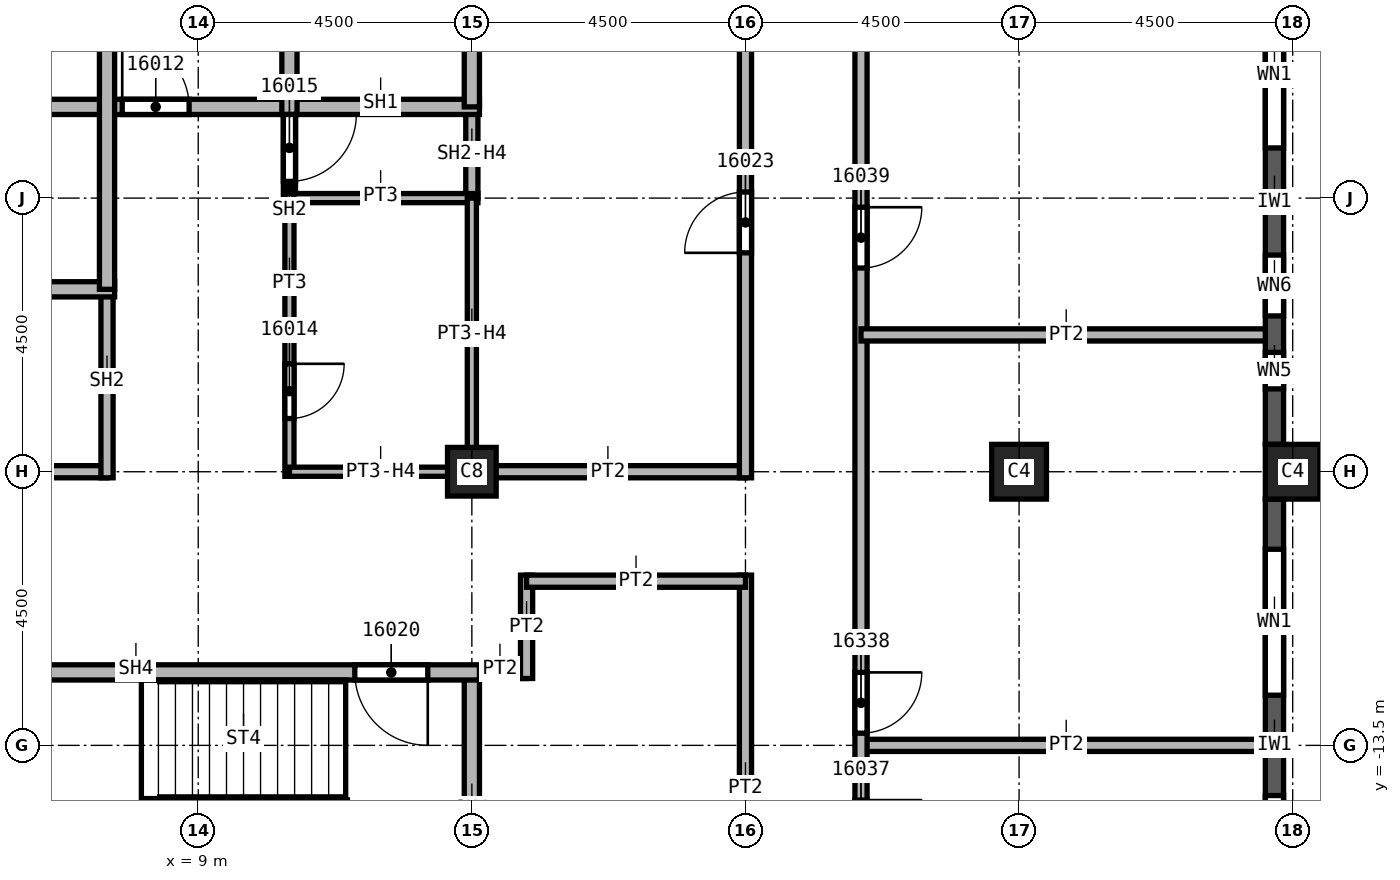
"""IFC4 building model, lengths in metres.
Left out: names, types, materials, properties, quantities, classifications, styles, units other than length and angle.
Written with IfcOpenShell. Run it as: python <this file> out.ifc"""

import sys

from ifc_helpers import new_model, si_unit, direction, frame, frame_2d, origin, origin_2d, place, context, subcontext, project, spatial, rectangle, extrude, element, fill, save


model = new_model("IFC4")
c1 = context("Model", 3, precision=1e-05, world=origin(), true_north=direction((0.0, 1.0)))
c2 = subcontext(c1, "Body", "Model", "MODEL_VIEW")
j1 = project(units=[si_unit("LENGTHUNIT", "METRE"), si_unit("PLANEANGLEUNIT", "RADIAN")], contexts=[c1])
p1 = place(None, origin())
s1 = spatial("IfcSite", under=j1, at=p1, CompositionType="ELEMENT")
p2 = place(p1, origin())
s2 = spatial("IfcBuilding", under=s1, at=p2, CompositionType="ELEMENT")
p3 = place(p2, frame((0.0, 0.0, 246.0)))
s3 = spatial("IfcBuildingStorey", under=s2, at=p3, CompositionType="ELEMENT", Elevation=246.0)
p4 = place(p3, frame((22.5, -9.0, 0.0), z_axis=(0.0, 0.0, 1.0), x_axis=(1.0, 0.0, 0.0)))
e1 = element("IfcColumn", 1, at=p4, inside=s3, PredefinedType="COLUMN", context=c2, shape_type="SweptSolid", body=[
    extrude(rectangle(XDim=0.9, YDim=0.9, at=origin_2d()), origin(), (0.0, 0.0, 1.0), 3.72),
])
p5 = place(p3, frame((13.5, -9.0, 0.0), z_axis=(0.0, 0.0, 1.0), x_axis=(1.0, 0.0, 0.0)))
e2 = element("IfcColumn", 2, at=p5, inside=s3, PredefinedType="COLUMN", context=c2, shape_type="SweptSolid", body=[
    extrude(rectangle(XDim=0.8, YDim=0.8, at=origin_2d()), origin(), (0.0, 0.0, 1.0), 3.72),
])
p6 = place(p3, frame((27.0, -9.0, 0.0), z_axis=(0.0, 0.0, 1.0), x_axis=(0.0, 1.0, 0.0)))
e3 = element("IfcColumn", 3, at=p6, inside=s3, PredefinedType="COLUMN", context=c2, shape_type="SweptSolid", body=[
    extrude(rectangle(XDim=0.9, YDim=0.9, at=origin_2d()), origin(), (0.0, 0.0, 1.0), 3.72),
])
p7 = place(p3, frame((26.7, -17.55, 0.0), z_axis=(0.0, 0.0, 1.0), x_axis=(0.0, 1.0, 0.0)))
e4 = element("IfcWall", 4, at=p7, inside=s3, PredefinedType="SOLIDWALL", context=c2, shape_type="SweptSolid", body=[
    extrude(rectangle(XDim=8.1, YDim=0.3, at=frame_2d((4.05, 0.0))), origin(), (0.0, 0.0, 1.0), 3.12),
])
p8 = place(p7, frame((0.825, 0.0, 0.8)))
e5 = element("IfcOpeningElement", 5, at=p8, cuts=e4, PredefinedType="OPENING", context=c2, shape_type="SweptSolid", body=[
    extrude(rectangle(XDim=2.4, YDim=1.95, at=frame_2d((1.2, 0.975))), frame((0.0, 0.15, 0.0), z_axis=(0.0, -1.0, 0.0), x_axis=(1.0, 0.0, 0.0)), (0.0, 0.0, 1.0), 0.3),
])
p9 = place(p7, frame((4.875, 0.0, 0.8)))
e6 = element("IfcOpeningElement", 6, at=p9, cuts=e4, PredefinedType="OPENING", context=c2, shape_type="SweptSolid", body=[
    extrude(rectangle(XDim=2.4, YDim=1.95, at=frame_2d((1.2, 0.975))), frame((0.0, 0.15, 0.0), z_axis=(0.0, -1.0, 0.0), x_axis=(1.0, 0.0, 0.0)), (0.0, 0.0, 1.0), 0.3),
])
p10 = place(p3, frame((26.7, -8.55, 0.0), z_axis=(0.0, 0.0, 1.0), x_axis=(0.0, 1.0, 0.0)))
e7 = element("IfcWall", 7, at=p10, inside=s3, PredefinedType="SOLIDWALL", context=c2, shape_type="SweptSolid", body=[
    extrude(rectangle(XDim=8.1, YDim=0.3, at=frame_2d((4.05, 0.0))), origin(), (0.0, 0.0, 1.0), 3.12),
])
p11 = place(p10, frame((4.875, 0.0, 0.8)))
e8 = element("IfcOpeningElement", 8, at=p11, cuts=e7, PredefinedType="OPENING", context=c2, shape_type="SweptSolid", body=[
    extrude(rectangle(XDim=2.4, YDim=1.95, at=frame_2d((1.2, 0.975))), frame((0.0, 0.15, 0.0), z_axis=(0.0, -1.0, 0.0), x_axis=(1.0, 0.0, 0.0)), (0.0, 0.0, 1.0), 0.3),
])
p12 = place(p10, frame((0.913, 0.0, 0.8)))
e9 = element("IfcOpeningElement", 9, at=p12, cuts=e7, PredefinedType="OPENING", context=c2, shape_type="SweptSolid", body=[
    extrude(rectangle(XDim=0.6, YDim=1.95, at=frame_2d((0.3, 0.975))), frame((0.0, 0.15, 0.0), z_axis=(0.0, -1.0, 0.0), x_axis=(1.0, 0.0, 0.0)), (0.0, 0.0, 1.0), 0.3),
])
p13 = place(p10, frame((2.113, 0.0, 0.8)))
e10 = element("IfcOpeningElement", 10, at=p13, cuts=e7, PredefinedType="OPENING", context=c2, shape_type="SweptSolid", body=[
    extrude(rectangle(XDim=1.0, YDim=1.95, at=frame_2d((0.5, 0.975))), frame((0.0, 0.15, 0.0), z_axis=(0.0, -1.0, 0.0), x_axis=(1.0, 0.0, 0.0)), (0.0, 0.0, 1.0), 0.3),
])
p14 = place(p3, frame((13.5, -9.0, 0.0), z_axis=(0.0, 0.0, 1.0), x_axis=(1.0, 0.0, 0.0)))
e11 = element("IfcWall", 11, at=p14, inside=s3, PredefinedType="PARTITIONING", context=c2, shape_type="SweptSolid", body=[
    extrude(rectangle(XDim=4.5, YDim=0.2, at=frame_2d((2.25, 0.0))), origin(), (0.0, 0.0, 1.0), 3.72),
])
p15 = place(p3, frame((14.4, -12.3, 0.0), z_axis=(0.0, 0.0, 1.0), x_axis=(-1.0, 0.0, 0.0)))
e12 = element("IfcWall", 12, at=p15, inside=s3, PredefinedType="PARTITIONING", context=c2, shape_type="SweptSolid", body=[
    extrude(rectangle(XDim=1.025, YDim=0.2, at=frame_2d((0.512, 0.0))), origin(), (0.0, 0.0, 1.0), 3.72),
])
p16 = place(p3, frame((14.4, -10.7, 0.0), z_axis=(0.0, 0.0, 1.0), x_axis=(0.0, -1.0, 0.0)))
e13 = element("IfcWall", 13, at=p16, inside=s3, PredefinedType="PARTITIONING", context=c2, shape_type="SweptSolid", body=[
    extrude(rectangle(XDim=1.7, YDim=0.2, at=frame_2d((0.85, 0.0))), origin(), (0.0, 0.0, 1.0), 3.72),
])
p17 = place(p3, frame((18.0, -21.9, 0.0), z_axis=(0.0, 0.0, 1.0), x_axis=(0.0, 1.0, 0.0)))
e14 = element("IfcWall", 14, at=p17, inside=s3, PredefinedType="PARTITIONING", context=c2, shape_type="SweptSolid", body=[
    extrude(rectangle(XDim=11.2, YDim=0.2, at=frame_2d((5.6, 0.0))), origin(), (0.0, 0.0, 1.0), 3.72),
])
p18 = place(p17, frame((3.4, 0.0, 0.0)))
e15 = element("IfcOpeningElement", 15, at=p18, cuts=e14, PredefinedType="OPENING", context=c2, shape_type="SweptSolid", body=[
    extrude(rectangle(XDim=1.0, YDim=2.1, at=frame_2d((0.5, 1.05))), frame((0.0, 0.1, 0.0), z_axis=(0.0, -1.0, 0.0), x_axis=(1.0, 0.0, 0.0)), (0.0, 0.0, 1.0), 0.2),
])
p19 = place(p3, frame((18.0, -10.8, 0.0), z_axis=(0.0, 0.0, 1.0), x_axis=(-1.0, 0.0, 0.0)))
e16 = element("IfcWall", 16, at=p19, inside=s3, PredefinedType="PARTITIONING", context=c2, shape_type="SweptSolid", body=[
    extrude(rectangle(XDim=3.6, YDim=0.2, at=frame_2d((1.8, 0.0))), origin(), (0.0, 0.0, 1.0), 3.72),
])
p20 = place(p3, frame((18.0, -9.1, 0.0), z_axis=(0.0, 0.0, 1.0), x_axis=(0.0, 1.0, 0.0)))
e17 = element("IfcWall", 17, at=p20, inside=s3, PredefinedType="PARTITIONING", context=c2, shape_type="SweptSolid", body=[
    extrude(rectangle(XDim=18.2, YDim=0.2, at=frame_2d((9.1, 0.0))), origin(), (0.0, 0.0, 1.0), 3.72),
])
p21 = place(p20, frame((3.7, 0.0, 0.0)))
e18 = element("IfcOpeningElement", 18, at=p21, cuts=e17, PredefinedType="OPENING", context=c2, shape_type="SweptSolid", body=[
    extrude(rectangle(XDim=1.0, YDim=2.1, at=frame_2d((0.5, 1.05))), frame((0.0, 0.1, 0.0), z_axis=(0.0, -1.0, 0.0), x_axis=(1.0, 0.0, 0.0)), (0.0, 0.0, 1.0), 0.2),
])
p22 = place(p20, frame((16.9, 0.0, 0.0)))
e19 = element("IfcOpeningElement", 19, at=p22, cuts=e17, PredefinedType="OPENING", context=c2, shape_type="SweptSolid", body=[
    extrude(rectangle(XDim=1.0, YDim=2.1, at=frame_2d((0.5, 1.05))), frame((0.0, 0.1, 0.0), z_axis=(0.0, -1.0, 0.0), x_axis=(1.0, 0.0, 0.0)), (0.0, 0.0, 1.0), 0.2),
])
p23 = place(p3, frame((19.9, -13.5, 0.0), z_axis=(0.0, 0.0, 1.0), x_axis=(1.0, 0.0, 0.0)))
e20 = element("IfcWall", 20, at=p23, inside=s3, PredefinedType="PARTITIONING", context=c2, shape_type="SweptSolid", body=[
    extrude(rectangle(XDim=6.65, YDim=0.2, at=frame_2d((3.325, 0.0))), origin(), (0.0, 0.0, 1.0), 3.72),
])
p24 = place(p3, frame((19.9, 21.9, 0.0), z_axis=(0.0, 0.0, 1.0), x_axis=(0.0, -1.0, 0.0)))
e21 = element("IfcWall", 21, at=p24, inside=s3, PredefinedType="PARTITIONING", context=c2, shape_type="SweptSolid", body=[
    extrude(rectangle(XDim=43.8, YDim=0.2, at=frame_2d((21.9, 0.0))), origin(), (0.0, 0.0, 1.0), 3.72),
])
p25 = place(p24, frame((14.7, 0.0, 0.0)))
e22 = element("IfcOpeningElement", 22, at=p25, cuts=e21, PredefinedType="OPENING", context=c2, shape_type="SweptSolid", body=[
    extrude(rectangle(XDim=1.0, YDim=2.1, at=frame_2d((0.5, 1.05))), frame((0.0, 0.1, 0.0), z_axis=(0.0, -1.0, 0.0), x_axis=(1.0, 0.0, 0.0)), (0.0, 0.0, 1.0), 0.2),
])
p26 = place(p24, frame((1.9, 0.0, 0.0)))
e23 = element("IfcOpeningElement", 23, at=p26, cuts=e21, PredefinedType="OPENING", context=c2, shape_type="SweptSolid", body=[
    extrude(rectangle(XDim=1.0, YDim=2.1, at=frame_2d((0.5, 1.05))), frame((0.0, 0.1, 0.0), z_axis=(0.0, -1.0, 0.0), x_axis=(1.0, 0.0, 0.0)), (0.0, 0.0, 1.0), 0.2),
])
p27 = place(p24, frame((36.3, 0.0, 0.0)))
e24 = element("IfcOpeningElement", 24, at=p27, cuts=e21, PredefinedType="OPENING", context=c2, shape_type="SweptSolid", body=[
    extrude(rectangle(XDim=1.0, YDim=2.1, at=frame_2d((0.5, 1.05))), frame((0.0, 0.1, 0.0), z_axis=(0.0, -1.0, 0.0), x_axis=(1.0, 0.0, 0.0)), (0.0, 0.0, 1.0), 0.2),
])
p28 = place(p24, frame((34.2, 0.0, 0.0)))
e25 = element("IfcOpeningElement", 25, at=p28, cuts=e21, PredefinedType="OPENING", context=c2, shape_type="SweptSolid", body=[
    extrude(rectangle(XDim=1.0, YDim=2.1, at=frame_2d((0.5, 1.05))), frame((0.0, 0.1, 0.0), z_axis=(0.0, -1.0, 0.0), x_axis=(1.0, 0.0, 0.0)), (0.0, 0.0, 1.0), 0.2),
])
p29 = place(p24, frame((26.55, 0.0, 0.0)))
e26 = element("IfcOpeningElement", 26, at=p29, cuts=e21, PredefinedType="OPENING", context=c2, shape_type="SweptSolid", body=[
    extrude(rectangle(XDim=1.0, YDim=2.1, at=frame_2d((0.5, 1.05))), frame((0.0, 0.1, 0.0), z_axis=(0.0, -1.0, 0.0), x_axis=(1.0, 0.0, 0.0)), (0.0, 0.0, 1.0), 0.2),
])
p30 = place(p3, frame((19.9, -6.75, 0.0), z_axis=(0.0, 0.0, 1.0), x_axis=(1.0, 0.0, 0.0)))
e27 = element("IfcWall", 27, at=p30, inside=s3, PredefinedType="PARTITIONING", context=c2, shape_type="SweptSolid", body=[
    extrude(rectangle(XDim=6.65, YDim=0.2, at=frame_2d((3.325, 0.0))), origin(), (0.0, 0.0, 1.0), 3.72),
])
p31 = place(p3, frame((7.5, -9.0, 0.0), z_axis=(0.0, 0.0, 1.0), x_axis=(-1.0, 0.0, 0.0)))
e28 = element("IfcWall", 28, at=p31, inside=s3, PredefinedType="SOLIDWALL", context=c2, shape_type="SweptSolid", body=[
    extrude(rectangle(XDim=3.0, YDim=0.2, at=frame_2d((1.5, 0.0))), origin(), (0.0, 0.0, 1.0), 3.042),
])
p32 = place(p3, frame((7.5, -6.0, 0.0), z_axis=(0.0, 0.0, 1.0), x_axis=(0.0, -1.0, 0.0)))
e29 = element("IfcWall", 29, at=p32, inside=s3, PredefinedType="SOLIDWALL", context=c2, shape_type="SweptSolid", body=[
    extrude(rectangle(XDim=3.1, YDim=0.2, at=frame_2d((1.55, 0.0))), origin(), (0.0, 0.0, 1.0), 3.72),
])
p33 = place(p3, frame((10.5, -2.875, 0.0), z_axis=(0.0, 0.0, 1.0), x_axis=(0.0, -1.0, 0.0)))
e30 = element("IfcWall", 30, at=p33, inside=s3, PredefinedType="SOLIDWALL", context=c2, shape_type="SweptSolid", body=[
    extrude(rectangle(XDim=1.7, YDim=0.2, at=frame_2d((0.85, 0.0))), origin(), (0.0, 0.0, 1.0), 3.72),
])
p34 = place(p33, frame((0.25, 0.0, 0.0)))
e31 = element("IfcOpeningElement", 31, at=p34, cuts=e30, PredefinedType="OPENING", context=c2, shape_type="SweptSolid", body=[
    extrude(rectangle(XDim=1.1, YDim=2.1, at=frame_2d((0.55, 1.05))), frame((0.0, 0.1, 0.0), z_axis=(0.0, -1.0, 0.0), x_axis=(1.0, 0.0, 0.0)), (0.0, 0.0, 1.0), 0.2),
])
p35 = place(p3, frame((13.5, -3.0, 0.0), z_axis=(0.0, 0.0, 1.0), x_axis=(0.0, -1.0, 0.0)))
e32 = element("IfcWall", 32, at=p35, inside=s3, PredefinedType="SOLIDWALL", context=c2, shape_type="SweptSolid", body=[
    extrude(rectangle(XDim=1.5, YDim=0.2, at=frame_2d((0.75, 0.0))), origin(), (0.0, 0.0, 1.0), 3.042),
])
p36 = place(p3, frame((4.375, -6.0, 0.0), z_axis=(0.0, 0.0, 1.0), x_axis=(1.0, 0.0, 0.0)))
e33 = element("IfcWall", 33, at=p36, inside=s3, PredefinedType="SOLIDWALL", context=c2, shape_type="SweptSolid", body=[
    extrude(rectangle(XDim=3.25, YDim=0.25, at=frame_2d((1.625, 0.0))), origin(), (0.0, 0.0, 1.0), 3.72),
])
p37 = place(p3, frame((4.375, -3.0, 0.0), z_axis=(0.0, 0.0, 1.0), x_axis=(1.0, 0.0, 0.0)))
e34 = element("IfcWall", 34, at=p37, inside=s3, PredefinedType="SOLIDWALL", context=c2, shape_type="SweptSolid", body=[
    extrude(rectangle(XDim=9.25, YDim=0.25, at=frame_2d((4.625, 0.0))), origin(), (0.0, 0.0, 1.0), 3.72),
])
p38 = place(p37, frame((3.375, 0.0, 0.0)))
e35 = element("IfcOpeningElement", 35, at=p38, cuts=e34, PredefinedType="OPENING", context=c2, shape_type="SweptSolid", body=[
    extrude(rectangle(XDim=1.1, YDim=2.1, at=frame_2d((0.55, 1.05))), frame((0.0, 0.125, 0.0), z_axis=(0.0, -1.0, 0.0), x_axis=(1.0, 0.0, 0.0)), (0.0, 0.0, 1.0), 0.25),
])
p39 = place(p3, frame((7.5, 3.125, 0.0), z_axis=(0.0, 0.0, 1.0), x_axis=(0.0, -1.0, 0.0)))
e36 = element("IfcWall", 36, at=p39, inside=s3, PredefinedType="SOLIDWALL", context=c2, shape_type="SweptSolid", body=[
    extrude(rectangle(XDim=9.125, YDim=0.25, at=frame_2d((4.562, 0.0))), origin(), (0.0, 0.0, 1.0), 3.72),
])
p40 = place(p3, frame((10.5, 6.125, 0.0), z_axis=(0.0, 0.0, 1.0), x_axis=(0.0, -1.0, 0.0)))
e37 = element("IfcWall", 37, at=p40, inside=s3, PredefinedType="SOLIDWALL", context=c2, shape_type="SweptSolid", body=[
    extrude(rectangle(XDim=9.25, YDim=0.25, at=frame_2d((4.625, 0.0))), origin(), (0.0, 0.0, 1.0), 3.72),
])
p41 = place(p40, frame((7.075, 0.0, 0.0)))
e38 = element("IfcOpeningElement", 38, at=p41, cuts=e37, PredefinedType="OPENING", context=c2, shape_type="SweptSolid", body=[
    extrude(rectangle(XDim=1.1, YDim=2.1, at=frame_2d((0.55, 1.05))), frame((0.0, 0.125, 0.0), z_axis=(0.0, -1.0, 0.0), x_axis=(1.0, 0.0, 0.0)), (0.0, 0.0, 1.0), 0.25),
])
p42 = place(p40, frame((4.075, 0.0, 0.0)))
e39 = element("IfcOpeningElement", 39, at=p42, cuts=e37, PredefinedType="OPENING", context=c2, shape_type="SweptSolid", body=[
    extrude(rectangle(XDim=1.1, YDim=2.1, at=frame_2d((0.55, 1.05))), frame((0.0, 0.125, 0.0), z_axis=(0.0, -1.0, 0.0), x_axis=(1.0, 0.0, 0.0)), (0.0, 0.0, 1.0), 0.25),
])
p43 = place(p3, frame((13.5, 6.0, 0.0), z_axis=(0.0, 0.0, 1.0), x_axis=(0.0, -1.0, 0.0)))
e40 = element("IfcWall", 40, at=p43, inside=s3, PredefinedType="SOLIDWALL", context=c2, shape_type="SweptSolid", body=[
    extrude(rectangle(XDim=9.0, YDim=0.25, at=frame_2d((4.5, 0.0))), origin(), (0.0, 0.0, 1.0), 3.042),
])
p44 = place(p3, frame((13.5, -12.3, 0.0), z_axis=(0.0, 0.0, 1.0), x_axis=(0.0, -1.0, 0.0)))
e41 = element("IfcWall", 41, at=p44, inside=s3, PredefinedType="SOLIDWALL", context=c2, shape_type="SweptSolid", body=[
    extrude(rectangle(XDim=4.625, YDim=0.25, at=frame_2d((2.312, 0.0))), origin(), (0.0, 0.0, 1.0), 3.72),
])
p45 = place(p3, frame((13.625, -12.3, 0.0), z_axis=(0.0, 0.0, 1.0), x_axis=(-1.0, 0.0, 0.0)))
e42 = element("IfcWall", 42, at=p45, inside=s3, PredefinedType="SOLIDWALL", context=c2, shape_type="SweptSolid", body=[
    extrude(rectangle(XDim=9.25, YDim=0.25, at=frame_2d((4.625, 0.0))), origin(), (0.0, 0.0, 1.0), 3.72),
])
p46 = place(p45, frame((0.85, 0.0, 0.0)))
e43 = element("IfcOpeningElement", 43, at=p46, cuts=e42, PredefinedType="OPENING", context=c2, shape_type="SweptSolid", body=[
    extrude(rectangle(XDim=1.2, YDim=2.1, at=frame_2d((0.6, 1.05))), frame((0.0, 0.125, 0.0), z_axis=(0.0, -1.0, 0.0), x_axis=(1.0, 0.0, 0.0)), (0.0, 0.0, 1.0), 0.25),
])
p47 = place(p3, frame((10.5, -4.5, 0.0), z_axis=(0.0, 0.0, 1.0), x_axis=(1.0, 0.0, 0.0)))
e44 = element("IfcWall", 44, at=p47, inside=s3, PredefinedType="PARTITIONING", context=c2, shape_type="SweptSolid", body=[
    extrude(rectangle(XDim=3.1, YDim=0.15, at=frame_2d((1.55, 0.0))), origin(), (0.0, 0.0, 1.0), 3.72),
])
p48 = place(p3, frame((10.5, -4.425, 0.0), z_axis=(0.0, 0.0, 1.0), x_axis=(0.0, -1.0, 0.0)))
e45 = element("IfcWall", 45, at=p48, inside=s3, PredefinedType="PARTITIONING", context=c2, shape_type="SweptSolid", body=[
    extrude(rectangle(XDim=4.65, YDim=0.15, at=frame_2d((2.325, 0.0))), origin(), (0.0, 0.0, 1.0), 3.72),
])
p49 = place(p48, frame((2.8, 0.0, 0.0)))
e46 = element("IfcOpeningElement", 46, at=p49, cuts=e45, PredefinedType="OPENING", context=c2, shape_type="SweptSolid", body=[
    extrude(rectangle(XDim=0.9, YDim=2.1, at=frame_2d((0.45, 1.05))), frame((0.0, 0.075, 0.0), z_axis=(0.0, -1.0, 0.0), x_axis=(1.0, 0.0, 0.0)), (0.0, 0.0, 1.0), 0.15),
])
p50 = place(p3, frame((13.5, -4.5, 0.0), z_axis=(0.0, 0.0, 1.0), x_axis=(0.0, -1.0, 0.0)))
e47 = element("IfcWall", 47, at=p50, inside=s3, PredefinedType="PARTITIONING", context=c2, shape_type="SweptSolid", body=[
    extrude(rectangle(XDim=4.6, YDim=0.15, at=frame_2d((2.3, 0.0))), origin(), (0.0, 0.0, 1.0), 3.042),
])
p51 = place(p3, frame((13.575, -9.0, 0.0), z_axis=(0.0, 0.0, 1.0), x_axis=(-1.0, 0.0, 0.0)))
e48 = element("IfcWall", 48, at=p51, inside=s3, PredefinedType="PARTITIONING", context=c2, shape_type="SweptSolid", body=[
    extrude(rectangle(XDim=3.075, YDim=0.15, at=frame_2d((1.538, 0.0))), origin(), (0.0, 0.0, 1.0), 3.042),
])
p52 = place(p8, origin())
e49 = element("IfcWindow", 49, at=p52, inside=s3, PartitioningType="SINGLE_PANEL", PredefinedType="WINDOW", context=c2, shape_type="SweptSolid", body=[
    extrude(rectangle(XDim=2.4, YDim=1.95, at=frame_2d((1.2, 0.975))), frame((0.0, 0.03, 0.0), z_axis=(0.0, -1.0, 0.0), x_axis=(1.0, 0.0, 0.0)), (0.0, 0.0, 1.0), 0.06),
])
fill(e5, e49)
p53 = place(p9, origin())
e50 = element("IfcWindow", 50, at=p53, inside=s3, PartitioningType="SINGLE_PANEL", PredefinedType="WINDOW", context=c2, shape_type="SweptSolid", body=[
    extrude(rectangle(XDim=2.4, YDim=1.95, at=frame_2d((1.2, 0.975))), frame((0.0, 0.03, 0.0), z_axis=(0.0, -1.0, 0.0), x_axis=(1.0, 0.0, 0.0)), (0.0, 0.0, 1.0), 0.06),
])
fill(e6, e50)
p54 = place(p11, origin())
e51 = element("IfcWindow", 51, at=p54, inside=s3, PartitioningType="SINGLE_PANEL", PredefinedType="WINDOW", context=c2, shape_type="SweptSolid", body=[
    extrude(rectangle(XDim=2.4, YDim=1.95, at=frame_2d((1.2, 0.975))), frame((0.0, 0.03, 0.0), z_axis=(0.0, -1.0, 0.0), x_axis=(1.0, 0.0, 0.0)), (0.0, 0.0, 1.0), 0.06),
])
fill(e8, e51)
p55 = place(p38, origin())
e52 = element("IfcDoor", 52, at=p55, inside=s3, OperationType="SINGLE_SWING_LEFT", PredefinedType="DOOR", context=c2, shape_type="SweptSolid", body=[
    extrude(rectangle(XDim=1.1, YDim=2.1, at=frame_2d((0.55, 1.05))), frame((0.0, 0.025, 0.0), z_axis=(0.0, -1.0, 0.0), x_axis=(1.0, 0.0, 0.0)), (0.0, 0.0, 1.0), 0.05),
])
fill(e35, e52)
p56 = place(p49, origin())
e53 = element("IfcDoor", 53, at=p56, inside=s3, OperationType="SINGLE_SWING_LEFT", PredefinedType="DOOR", context=c2, shape_type="SweptSolid", body=[
    extrude(rectangle(XDim=0.9, YDim=2.1, at=frame_2d((0.45, 1.05))), frame((0.0, 0.025, 0.0), z_axis=(0.0, -1.0, 0.0), x_axis=(1.0, 0.0, 0.0)), (0.0, 0.0, 1.0), 0.05),
])
fill(e46, e53)
p57 = place(p34, origin())
e54 = element("IfcDoor", 54, at=p57, inside=s3, OperationType="SINGLE_SWING_RIGHT", PredefinedType="DOOR", context=c2, shape_type="SweptSolid", body=[
    extrude(rectangle(XDim=1.1, YDim=2.1, at=frame_2d((0.55, 1.05))), frame((0.0, 0.025, 0.0), z_axis=(0.0, -1.0, 0.0), x_axis=(1.0, 0.0, 0.0)), (0.0, 0.0, 1.0), 0.05),
])
fill(e31, e54)
p58 = place(p46, origin())
e55 = element("IfcDoor", 55, at=p58, inside=s3, OperationType="SINGLE_SWING_LEFT", PredefinedType="DOOR", context=c2, shape_type="SweptSolid", body=[
    extrude(rectangle(XDim=1.2, YDim=2.1, at=frame_2d((0.6, 1.05))), frame((0.0, 0.025, 0.0), z_axis=(0.0, -1.0, 0.0), x_axis=(1.0, 0.0, 0.0)), (0.0, 0.0, 1.0), 0.05),
])
fill(e43, e55)
p59 = place(p21, origin())
e56 = element("IfcDoor", 56, at=p59, inside=s3, OperationType="SINGLE_SWING_RIGHT", PredefinedType="DOOR", context=c2, shape_type="SweptSolid", body=[
    extrude(rectangle(XDim=1.0, YDim=2.1, at=frame_2d((0.5, 1.05))), frame((0.0, 0.025, 0.0), z_axis=(0.0, -1.0, 0.0), x_axis=(1.0, 0.0, 0.0)), (0.0, 0.0, 1.0), 0.05),
])
fill(e18, e56)
p60 = place(p28, origin())
e57 = element("IfcDoor", 57, at=p60, inside=s3, OperationType="SINGLE_SWING_LEFT", PredefinedType="DOOR", context=c2, shape_type="SweptSolid", body=[
    extrude(rectangle(XDim=1.0, YDim=2.1, at=frame_2d((0.5, 1.05))), frame((0.0, 0.025, 0.0), z_axis=(0.0, -1.0, 0.0), x_axis=(1.0, 0.0, 0.0)), (0.0, 0.0, 1.0), 0.05),
])
fill(e25, e57)
p61 = place(p29, origin())
e58 = element("IfcDoor", 58, at=p61, inside=s3, OperationType="SINGLE_SWING_RIGHT", PredefinedType="DOOR", context=c2, shape_type="SweptSolid", body=[
    extrude(rectangle(XDim=1.0, YDim=2.1, at=frame_2d((0.5, 1.05))), frame((0.0, 0.025, 0.0), z_axis=(0.0, -1.0, 0.0), x_axis=(1.0, 0.0, 0.0)), (0.0, 0.0, 1.0), 0.05),
])
fill(e26, e58)
p62 = place(p12, origin())
e59 = element("IfcWindow", 59, at=p62, inside=s3, PartitioningType="SINGLE_PANEL", PredefinedType="WINDOW", context=c2, shape_type="SweptSolid", body=[
    extrude(rectangle(XDim=0.6, YDim=1.95, at=frame_2d((0.3, 0.975))), frame((0.0, 0.03, 0.0), z_axis=(0.0, -1.0, 0.0), x_axis=(1.0, 0.0, 0.0)), (0.0, 0.0, 1.0), 0.06),
])
fill(e9, e59)
p63 = place(p13, origin())
e60 = element("IfcWindow", 60, at=p63, inside=s3, PartitioningType="SINGLE_PANEL", PredefinedType="WINDOW", context=c2, shape_type="SweptSolid", body=[
    extrude(rectangle(XDim=1.0, YDim=1.95, at=frame_2d((0.5, 0.975))), frame((0.0, 0.03, 0.0), z_axis=(0.0, -1.0, 0.0), x_axis=(1.0, 0.0, 0.0)), (0.0, 0.0, 1.0), 0.06),
])
fill(e10, e60)
save(model, sys.argv[1])
